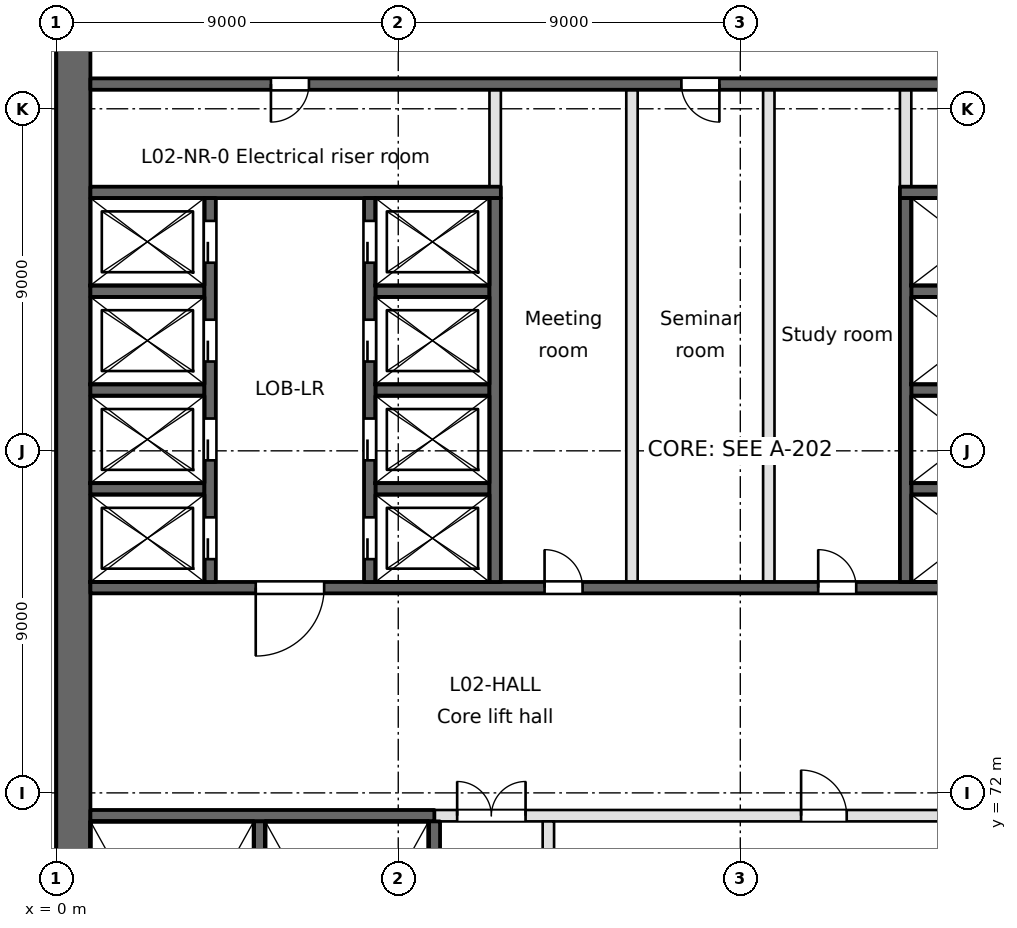
"""IFC4 building model, lengths in metres.
Left out: names, types, materials, properties, quantities, classifications, styles, units other than length and angle.
Written with IfcOpenShell. Run it as: python <this file> out.ifc"""

import sys

from ifc_helpers import new_model, si_unit, direction, frame, frame_2d, origin, place, context, subcontext, project, spatial, rectangle, extrude, element, fill, save


model = new_model("IFC4")
c1 = context("Model", 3, precision=1e-05, world=origin(), true_north=direction((0.0, 1.0)))
c2 = subcontext(c1, "Body", "Model", "MODEL_VIEW")
j1 = project(units=[si_unit("LENGTHUNIT", "METRE"), si_unit("PLANEANGLEUNIT", "RADIAN")], contexts=[c1])
p1 = place(None, origin())
s1 = spatial("IfcSite", under=j1, at=p1, CompositionType="ELEMENT")
p2 = place(p1, origin())
s2 = spatial("IfcBuilding", under=s1, at=p2, CompositionType="ELEMENT")
p3 = place(p2, frame((0.0, 0.0, 11.4)))
s3 = spatial("IfcBuildingStorey", under=s2, at=p3, CompositionType="ELEMENT", Elevation=11.4)
p4 = place(p3, frame((0.45, 94.5, 0.0), z_axis=(0.0, 0.0, 1.0), x_axis=(0.0, -1.0, 0.0)))
e1 = element("IfcWall", 1, at=p4, inside=s3, PredefinedType="SHEAR", context=c2, shape_type="SweptSolid", body=[
    extrude(rectangle(XDim=66.085, YDim=0.9, at=frame_2d((33.042, 0.0))), origin(), (0.0, 0.0, 1.0), 5.4),
])
p5 = place(p3, frame((0.9, 71.4, -0.35), z_axis=(0.0, 0.0, 1.0), x_axis=(1.0, 0.0, 0.0)))
e2 = element("IfcWall", 2, at=p5, inside=s3, PredefinedType="SOLIDWALL", context=c2, shape_type="SweptSolid", body=[
    extrude(rectangle(XDim=9.05, YDim=0.3, at=frame_2d((4.525, 0.0))), origin(), (0.0, 0.0, 1.0), 5.4),
])
p6 = place(p3, frame((9.95, 71.4, 0.0), z_axis=(0.0, 0.0, 1.0), x_axis=(1.0, 0.0, 0.0)))
e3 = element("IfcWall", 3, at=p6, inside=s3, PredefinedType="PARTITIONING", context=c2, shape_type="SweptSolid", body=[
    extrude(rectangle(XDim=17.65, YDim=0.3, at=frame_2d((8.825, 0.0))), origin(), (0.0, 0.0, 1.0), 5.05),
])
p7 = place(p6, frame((0.6, 0.0, 0.0)))
e4 = element("IfcOpeningElement", 4, at=p7, cuts=e3, PredefinedType="OPENING", context=c2, shape_type="SweptSolid", body=[
    extrude(rectangle(XDim=1.8, YDim=2.1, at=frame_2d((0.9, 1.05))), frame((0.0, 0.15, 0.0), z_axis=(0.0, -1.0, 0.0), x_axis=(1.0, 0.0, 0.0)), (0.0, 0.0, 1.0), 0.3),
])
p8 = place(p6, frame((9.65, 0.0, 0.0)))
e5 = element("IfcOpeningElement", 5, at=p8, cuts=e3, PredefinedType="OPENING", context=c2, shape_type="SweptSolid", body=[
    extrude(rectangle(XDim=1.2, YDim=2.1, at=frame_2d((0.6, 1.05))), frame((0.0, 0.15, 0.0), z_axis=(0.0, -1.0, 0.0), x_axis=(1.0, 0.0, 0.0)), (0.0, 0.0, 1.0), 0.3),
])
p9 = place(p3, frame((0.9, 77.4, -0.35), z_axis=(0.0, 0.0, 1.0), x_axis=(1.0, 0.0, 0.0)))
e6 = element("IfcWall", 6, at=p9, inside=s3, PredefinedType="SOLIDWALL", context=c2, shape_type="SweptSolid", body=[
    extrude(rectangle(XDim=28.95, YDim=0.3, at=frame_2d((14.475, 0.0))), origin(), (0.0, 0.0, 1.0), 5.4),
])
p10 = place(p9, frame((4.35, 0.0, 0.35)))
e7 = element("IfcOpeningElement", 7, at=p10, cuts=e6, PredefinedType="OPENING", context=c2, shape_type="SweptSolid", body=[
    extrude(rectangle(XDim=1.8, YDim=2.1, at=frame_2d((0.9, 1.05))), frame((0.0, 0.15, 0.0), z_axis=(0.0, -1.0, 0.0), x_axis=(1.0, 0.0, 0.0)), (0.0, 0.0, 1.0), 0.3),
])
p11 = place(p9, frame((25.95, 0.0, 0.35)))
e8 = element("IfcOpeningElement", 8, at=p11, cuts=e6, PredefinedType="OPENING", context=c2, shape_type="SweptSolid", body=[
    extrude(rectangle(XDim=1.8, YDim=2.1, at=frame_2d((0.9, 1.05))), frame((0.0, 0.15, 0.0), z_axis=(0.0, -1.0, 0.0), x_axis=(1.0, 0.0, 0.0)), (0.0, 0.0, 1.0), 0.3),
])
p12 = place(p9, frame((11.95, 0.0, 0.35)))
e9 = element("IfcOpeningElement", 9, at=p12, cuts=e6, PredefinedType="OPENING", context=c2, shape_type="SweptSolid", body=[
    extrude(rectangle(XDim=1.0, YDim=2.1, at=frame_2d((0.5, 1.05))), frame((0.0, 0.15, 0.0), z_axis=(0.0, -1.0, 0.0), x_axis=(1.0, 0.0, 0.0)), (0.0, 0.0, 1.0), 0.3),
])
p13 = place(p9, frame((19.15, 0.0, 0.35)))
e10 = element("IfcOpeningElement", 10, at=p13, cuts=e6, PredefinedType="OPENING", context=c2, shape_type="SweptSolid", body=[
    extrude(rectangle(XDim=1.0, YDim=2.1, at=frame_2d((0.5, 1.05))), frame((0.0, 0.15, 0.0), z_axis=(0.0, -1.0, 0.0), x_axis=(1.0, 0.0, 0.0)), (0.0, 0.0, 1.0), 0.3),
])
for number, where, z_axis, x_axis in (
    (11, (0.9, 80.0, -0.35), (0.0, 0.0, 1.0), (1.0, 0.0, 0.0)),
    (12, (8.4, 80.0, -0.35), (0.0, 0.0, 1.0), (1.0, 0.0, 0.0)),
    (13, (22.5, 80.0, -0.35), (0.0, 0.0, 1.0), (1.0, 0.0, 0.0)),
    (14, (0.9, 82.6, -0.35), (0.0, 0.0, 1.0), (1.0, 0.0, 0.0)),
    (15, (8.4, 82.6, -0.35), (0.0, 0.0, 1.0), (1.0, 0.0, 0.0)),
    (16, (22.5, 82.6, -0.35), (0.0, 0.0, 1.0), (1.0, 0.0, 0.0)),
    (17, (0.9, 85.2, -0.35), (0.0, 0.0, 1.0), (1.0, 0.0, 0.0)),
    (18, (8.4, 85.2, -0.35), (0.0, 0.0, 1.0), (1.0, 0.0, 0.0)),
    (19, (22.5, 85.2, -0.35), (0.0, 0.0, 1.0), (1.0, 0.0, 0.0)),
):
    element("IfcWall", number, at=place(p3, frame(where, z_axis=z_axis, x_axis=x_axis)), inside=s3, PredefinedType="SOLIDWALL", context=c2, shape_type="SweptSolid", body=[
        extrude(rectangle(XDim=3.0, YDim=0.3, at=frame_2d((1.5, 0.0))), origin(), (0.0, 0.0, 1.0), 5.4),
    ])
p14 = place(p3, frame((0.9, 87.8, -0.35), z_axis=(0.0, 0.0, 1.0), x_axis=(1.0, 0.0, 0.0)))
e20 = element("IfcWall", 20, at=p14, inside=s3, PredefinedType="SOLIDWALL", context=c2, shape_type="SweptSolid", body=[
    extrude(rectangle(XDim=10.8, YDim=0.3, at=frame_2d((5.4, 0.0))), origin(), (0.0, 0.0, 1.0), 5.4),
])
p15 = place(p3, frame((22.2, 87.8, -0.35), z_axis=(0.0, 0.0, 1.0), x_axis=(1.0, 0.0, 0.0)))
e21 = element("IfcWall", 21, at=p15, inside=s3, PredefinedType="SOLIDWALL", context=c2, shape_type="SweptSolid", body=[
    extrude(rectangle(XDim=7.8, YDim=0.3, at=frame_2d((3.9, 0.0))), origin(), (0.0, 0.0, 1.0), 5.4),
])
p16 = place(p3, frame((0.9, 90.65, -0.35), z_axis=(0.0, 0.0, 1.0), x_axis=(1.0, 0.0, 0.0)))
e22 = element("IfcWall", 22, at=p16, inside=s3, PredefinedType="SOLIDWALL", context=c2, shape_type="SweptSolid", body=[
    extrude(rectangle(XDim=34.6, YDim=0.3, at=frame_2d((17.3, 0.0))), origin(), (0.0, 0.0, 1.0), 5.4),
])
p17 = place(p16, frame((4.75, 0.0, 0.35)))
e23 = element("IfcOpeningElement", 23, at=p17, cuts=e22, PredefinedType="OPENING", context=c2, shape_type="SweptSolid", body=[
    extrude(rectangle(XDim=1.0, YDim=2.1, at=frame_2d((0.5, 1.05))), frame((0.0, 0.15, 0.0), z_axis=(0.0, -1.0, 0.0), x_axis=(1.0, 0.0, 0.0)), (0.0, 0.0, 1.0), 0.3),
])
p18 = place(p16, frame((24.7, 0.0, 0.35)))
e24 = element("IfcOpeningElement", 24, at=p18, cuts=e22, PredefinedType="OPENING", context=c2, shape_type="SweptSolid", body=[
    extrude(rectangle(XDim=1.0, YDim=2.1, at=frame_2d((0.5, 1.05))), frame((0.0, 0.15, 0.0), z_axis=(0.0, -1.0, 0.0), x_axis=(1.0, 0.0, 0.0)), (0.0, 0.0, 1.0), 0.3),
])
p19 = place(p16, frame((15.55, 0.0, 0.35)))
e25 = element("IfcOpeningElement", 25, at=p19, cuts=e22, PredefinedType="OPENING", context=c2, shape_type="SweptSolid", body=[
    extrude(rectangle(XDim=1.0, YDim=2.1, at=frame_2d((0.5, 1.05))), frame((0.0, 0.15, 0.0), z_axis=(0.0, -1.0, 0.0), x_axis=(1.0, 0.0, 0.0)), (0.0, 0.0, 1.0), 0.3),
])
p20 = place(p16, frame((31.4, 0.0, 0.35)))
e26 = element("IfcOpeningElement", 26, at=p20, cuts=e22, PredefinedType="OPENING", context=c2, shape_type="SweptSolid", body=[
    extrude(rectangle(XDim=1.0, YDim=2.1, at=frame_2d((0.5, 1.05))), frame((0.0, 0.15, 0.0), z_axis=(0.0, -1.0, 0.0), x_axis=(1.0, 0.0, 0.0)), (0.0, 0.0, 1.0), 0.3),
])
p21 = place(p3, frame((4.05, 77.55, -0.35), z_axis=(0.0, 0.0, 1.0), x_axis=(0.0, 1.0, 0.0)))
e27 = element("IfcWall", 27, at=p21, inside=s3, PredefinedType="SOLIDWALL", context=c2, shape_type="SweptSolid", body=[
    extrude(rectangle(XDim=10.1, YDim=0.3, at=frame_2d((5.05, 0.0))), origin(), (0.0, 0.0, 1.0), 5.4),
])
p22 = place(p21, frame((0.6, 0.0, 0.35)))
e28 = element("IfcOpeningElement", 28, at=p22, cuts=e27, PredefinedType="OPENING", context=c2, shape_type="SweptSolid", body=[
    extrude(rectangle(XDim=1.1, YDim=2.1, at=frame_2d((0.55, 1.05))), frame((0.0, 0.15, 0.0), z_axis=(0.0, -1.0, 0.0), x_axis=(1.0, 0.0, 0.0)), (0.0, 0.0, 1.0), 0.3),
])
p23 = place(p21, frame((3.2, 0.0, 0.35)))
e29 = element("IfcOpeningElement", 29, at=p23, cuts=e27, PredefinedType="OPENING", context=c2, shape_type="SweptSolid", body=[
    extrude(rectangle(XDim=1.1, YDim=2.1, at=frame_2d((0.55, 1.05))), frame((0.0, 0.15, 0.0), z_axis=(0.0, -1.0, 0.0), x_axis=(1.0, 0.0, 0.0)), (0.0, 0.0, 1.0), 0.3),
])
p24 = place(p21, frame((5.8, 0.0, 0.35)))
e30 = element("IfcOpeningElement", 30, at=p24, cuts=e27, PredefinedType="OPENING", context=c2, shape_type="SweptSolid", body=[
    extrude(rectangle(XDim=1.1, YDim=2.1, at=frame_2d((0.55, 1.05))), frame((0.0, 0.15, 0.0), z_axis=(0.0, -1.0, 0.0), x_axis=(1.0, 0.0, 0.0)), (0.0, 0.0, 1.0), 0.3),
])
p25 = place(p21, frame((8.4, 0.0, 0.35)))
e31 = element("IfcOpeningElement", 31, at=p25, cuts=e27, PredefinedType="OPENING", context=c2, shape_type="SweptSolid", body=[
    extrude(rectangle(XDim=1.1, YDim=2.1, at=frame_2d((0.55, 1.05))), frame((0.0, 0.15, 0.0), z_axis=(0.0, -1.0, 0.0), x_axis=(1.0, 0.0, 0.0)), (0.0, 0.0, 1.0), 0.3),
])
p26 = place(p3, frame((5.35, 63.5, -0.35), z_axis=(0.0, 0.0, 1.0), x_axis=(0.0, 1.0, 0.0)))
e32 = element("IfcWall", 32, at=p26, inside=s3, PredefinedType="SOLIDWALL", context=c2, shape_type="SweptSolid", body=[
    extrude(rectangle(XDim=7.75, YDim=0.3, at=frame_2d((3.875, 0.0))), origin(), (0.0, 0.0, 1.0), 5.4),
])
p27 = place(p3, frame((8.25, 77.55, -0.35), z_axis=(0.0, 0.0, 1.0), x_axis=(0.0, 1.0, 0.0)))
e33 = element("IfcWall", 33, at=p27, inside=s3, PredefinedType="SOLIDWALL", context=c2, shape_type="SweptSolid", body=[
    extrude(rectangle(XDim=10.1, YDim=0.3, at=frame_2d((5.05, 0.0))), origin(), (0.0, 0.0, 1.0), 5.4),
])
p28 = place(p27, frame((0.6, 0.0, 0.35)))
e34 = element("IfcOpeningElement", 34, at=p28, cuts=e33, PredefinedType="OPENING", context=c2, shape_type="SweptSolid", body=[
    extrude(rectangle(XDim=1.1, YDim=2.1, at=frame_2d((0.55, 1.05))), frame((0.0, 0.15, 0.0), z_axis=(0.0, -1.0, 0.0), x_axis=(1.0, 0.0, 0.0)), (0.0, 0.0, 1.0), 0.3),
])
p29 = place(p27, frame((3.2, 0.0, 0.35)))
e35 = element("IfcOpeningElement", 35, at=p29, cuts=e33, PredefinedType="OPENING", context=c2, shape_type="SweptSolid", body=[
    extrude(rectangle(XDim=1.1, YDim=2.1, at=frame_2d((0.55, 1.05))), frame((0.0, 0.15, 0.0), z_axis=(0.0, -1.0, 0.0), x_axis=(1.0, 0.0, 0.0)), (0.0, 0.0, 1.0), 0.3),
])
p30 = place(p27, frame((5.8, 0.0, 0.35)))
e36 = element("IfcOpeningElement", 36, at=p30, cuts=e33, PredefinedType="OPENING", context=c2, shape_type="SweptSolid", body=[
    extrude(rectangle(XDim=1.1, YDim=2.1, at=frame_2d((0.55, 1.05))), frame((0.0, 0.15, 0.0), z_axis=(0.0, -1.0, 0.0), x_axis=(1.0, 0.0, 0.0)), (0.0, 0.0, 1.0), 0.3),
])
p31 = place(p27, frame((8.4, 0.0, 0.35)))
e37 = element("IfcOpeningElement", 37, at=p31, cuts=e33, PredefinedType="OPENING", context=c2, shape_type="SweptSolid", body=[
    extrude(rectangle(XDim=1.1, YDim=2.1, at=frame_2d((0.55, 1.05))), frame((0.0, 0.15, 0.0), z_axis=(0.0, -1.0, 0.0), x_axis=(1.0, 0.0, 0.0)), (0.0, 0.0, 1.0), 0.3),
])
p32 = place(p3, frame((9.95, 63.5, -0.35), z_axis=(0.0, 0.0, 1.0), x_axis=(0.0, 1.0, 0.0)))
e38 = element("IfcWall", 38, at=p32, inside=s3, PredefinedType="SOLIDWALL", context=c2, shape_type="SweptSolid", body=[
    extrude(rectangle(XDim=7.75, YDim=0.3, at=frame_2d((3.875, 0.0))), origin(), (0.0, 0.0, 1.0), 5.4),
])
p33 = place(p3, frame((11.55, 77.55, -0.35), z_axis=(0.0, 0.0, 1.0), x_axis=(0.0, 1.0, 0.0)))
e39 = element("IfcWall", 39, at=p33, inside=s3, PredefinedType="SOLIDWALL", context=c2, shape_type="SweptSolid", body=[
    extrude(rectangle(XDim=10.1, YDim=0.3, at=frame_2d((5.05, 0.0))), origin(), (0.0, 0.0, 1.0), 5.4),
])
p34 = place(p3, frame((11.55, 87.95, 0.0), z_axis=(0.0, 0.0, 1.0), x_axis=(0.0, 1.0, 0.0)))
e40 = element("IfcWall", 40, at=p34, inside=s3, PredefinedType="PARTITIONING", context=c2, shape_type="SweptSolid", body=[
    extrude(rectangle(XDim=2.55, YDim=0.3, at=frame_2d((1.275, 0.0))), origin(), (0.0, 0.0, 1.0), 5.05),
])
p35 = place(p3, frame((12.95, 63.5, 0.0), z_axis=(0.0, 0.0, 1.0), x_axis=(0.0, 1.0, 0.0)))
e41 = element("IfcWall", 41, at=p35, inside=s3, PredefinedType="PARTITIONING", context=c2, shape_type="SweptSolid", body=[
    extrude(rectangle(XDim=7.75, YDim=0.3, at=frame_2d((3.875, 0.0))), origin(), (0.0, 0.0, 1.0), 5.05),
])
for number, where, z_axis, x_axis in (
    (42, (15.15, 77.55, 0.0), (0.0, 0.0, 1.0), (0.0, 1.0, 0.0)),
    (43, (18.75, 77.55, 0.0), (0.0, 0.0, 1.0), (0.0, 1.0, 0.0)),
):
    element("IfcWall", number, at=place(p3, frame(where, z_axis=z_axis, x_axis=x_axis)), inside=s3, PredefinedType="PARTITIONING", context=c2, shape_type="SweptSolid", body=[
        extrude(rectangle(XDim=12.95, YDim=0.3, at=frame_2d((6.475, 0.0))), origin(), (0.0, 0.0, 1.0), 5.05),
    ])
p36 = place(p3, frame((22.35, 77.55, -0.35), z_axis=(0.0, 0.0, 1.0), x_axis=(0.0, 1.0, 0.0)))
e44 = element("IfcWall", 44, at=p36, inside=s3, PredefinedType="SOLIDWALL", context=c2, shape_type="SweptSolid", body=[
    extrude(rectangle(XDim=10.1, YDim=0.3, at=frame_2d((5.05, 0.0))), origin(), (0.0, 0.0, 1.0), 5.4),
])
p37 = place(p3, frame((22.35, 87.95, 0.0), z_axis=(0.0, 0.0, 1.0), x_axis=(0.0, 1.0, 0.0)))
e45 = element("IfcWall", 45, at=p37, inside=s3, PredefinedType="PARTITIONING", context=c2, shape_type="SweptSolid", body=[
    extrude(rectangle(XDim=2.55, YDim=0.3, at=frame_2d((1.275, 0.0))), origin(), (0.0, 0.0, 1.0), 5.05),
])
p38 = place(p22, origin())
e46 = element("IfcDoor", 46, at=p38, inside=s3, OperationType="SLIDING_TO_RIGHT", PredefinedType="DOOR", context=c2, shape_type="SweptSolid", body=[
    extrude(rectangle(XDim=1.1, YDim=2.1, at=frame_2d((0.55, 1.05))), frame((0.0, 0.025, 0.0), z_axis=(0.0, -1.0, 0.0), x_axis=(1.0, 0.0, 0.0)), (0.0, 0.0, 1.0), 0.05),
])
fill(e28, e46)
p39 = place(p23, origin())
e47 = element("IfcDoor", 47, at=p39, inside=s3, OperationType="SLIDING_TO_LEFT", PredefinedType="DOOR", context=c2, shape_type="SweptSolid", body=[
    extrude(rectangle(XDim=1.1, YDim=2.1, at=frame_2d((0.55, 1.05))), frame((0.0, 0.025, 0.0), z_axis=(0.0, -1.0, 0.0), x_axis=(1.0, 0.0, 0.0)), (0.0, 0.0, 1.0), 0.05),
])
fill(e29, e47)
p40 = place(p24, origin())
e48 = element("IfcDoor", 48, at=p40, inside=s3, OperationType="SLIDING_TO_RIGHT", PredefinedType="DOOR", context=c2, shape_type="SweptSolid", body=[
    extrude(rectangle(XDim=1.1, YDim=2.1, at=frame_2d((0.55, 1.05))), frame((0.0, 0.025, 0.0), z_axis=(0.0, -1.0, 0.0), x_axis=(1.0, 0.0, 0.0)), (0.0, 0.0, 1.0), 0.05),
])
fill(e30, e48)
p41 = place(p25, origin())
e49 = element("IfcDoor", 49, at=p41, inside=s3, OperationType="SLIDING_TO_LEFT", PredefinedType="DOOR", context=c2, shape_type="SweptSolid", body=[
    extrude(rectangle(XDim=1.1, YDim=2.1, at=frame_2d((0.55, 1.05))), frame((0.0, 0.025, 0.0), z_axis=(0.0, -1.0, 0.0), x_axis=(1.0, 0.0, 0.0)), (0.0, 0.0, 1.0), 0.05),
])
fill(e31, e49)
p42 = place(p28, origin())
e50 = element("IfcDoor", 50, at=p42, inside=s3, OperationType="SLIDING_TO_RIGHT", PredefinedType="DOOR", context=c2, shape_type="SweptSolid", body=[
    extrude(rectangle(XDim=1.1, YDim=2.1, at=frame_2d((0.55, 1.05))), frame((0.0, 0.025, 0.0), z_axis=(0.0, -1.0, 0.0), x_axis=(1.0, 0.0, 0.0)), (0.0, 0.0, 1.0), 0.05),
])
fill(e34, e50)
p43 = place(p29, origin())
e51 = element("IfcDoor", 51, at=p43, inside=s3, OperationType="SLIDING_TO_LEFT", PredefinedType="DOOR", context=c2, shape_type="SweptSolid", body=[
    extrude(rectangle(XDim=1.1, YDim=2.1, at=frame_2d((0.55, 1.05))), frame((0.0, 0.025, 0.0), z_axis=(0.0, -1.0, 0.0), x_axis=(1.0, 0.0, 0.0)), (0.0, 0.0, 1.0), 0.05),
])
fill(e35, e51)
p44 = place(p30, origin())
e52 = element("IfcDoor", 52, at=p44, inside=s3, OperationType="SLIDING_TO_RIGHT", PredefinedType="DOOR", context=c2, shape_type="SweptSolid", body=[
    extrude(rectangle(XDim=1.1, YDim=2.1, at=frame_2d((0.55, 1.05))), frame((0.0, 0.025, 0.0), z_axis=(0.0, -1.0, 0.0), x_axis=(1.0, 0.0, 0.0)), (0.0, 0.0, 1.0), 0.05),
])
fill(e36, e52)
p45 = place(p31, origin())
e53 = element("IfcDoor", 53, at=p45, inside=s3, OperationType="SLIDING_TO_LEFT", PredefinedType="DOOR", context=c2, shape_type="SweptSolid", body=[
    extrude(rectangle(XDim=1.1, YDim=2.1, at=frame_2d((0.55, 1.05))), frame((0.0, 0.025, 0.0), z_axis=(0.0, -1.0, 0.0), x_axis=(1.0, 0.0, 0.0)), (0.0, 0.0, 1.0), 0.05),
])
fill(e37, e53)
p46 = place(p10, frame((1.8, 0.0, 0.0), z_axis=(0.0, 0.0, 1.0), x_axis=(-1.0, 0.0, 0.0)))
e54 = element("IfcDoor", 54, at=p46, inside=s3, OperationType="SINGLE_SWING_RIGHT", PredefinedType="DOOR", context=c2, shape_type="SweptSolid", body=[
    extrude(rectangle(XDim=1.8, YDim=2.1, at=frame_2d((0.9, 1.05))), frame((0.0, 0.025, 0.0), z_axis=(0.0, -1.0, 0.0), x_axis=(1.0, 0.0, 0.0)), (0.0, 0.0, 1.0), 0.05),
])
fill(e7, e54)
p47 = place(p7, origin())
e55 = element("IfcDoor", 55, at=p47, inside=s3, OperationType="DOUBLE_DOOR_SINGLE_SWING", PredefinedType="DOOR", context=c2, shape_type="SweptSolid", body=[
    extrude(rectangle(XDim=1.8, YDim=2.1, at=frame_2d((0.9, 1.05))), frame((0.0, 0.025, 0.0), z_axis=(0.0, -1.0, 0.0), x_axis=(1.0, 0.0, 0.0)), (0.0, 0.0, 1.0), 0.05),
])
fill(e4, e55)
p48 = place(p8, origin())
e56 = element("IfcDoor", 56, at=p48, inside=s3, OperationType="SINGLE_SWING_LEFT", PredefinedType="DOOR", context=c2, shape_type="SweptSolid", body=[
    extrude(rectangle(XDim=1.2, YDim=2.1, at=frame_2d((0.6, 1.05))), frame((0.0, 0.025, 0.0), z_axis=(0.0, -1.0, 0.0), x_axis=(1.0, 0.0, 0.0)), (0.0, 0.0, 1.0), 0.05),
])
fill(e5, e56)
p49 = place(p17, frame((1.0, 0.0, 0.0), z_axis=(0.0, 0.0, 1.0), x_axis=(-1.0, 0.0, 0.0)))
e57 = element("IfcDoor", 57, at=p49, inside=s3, OperationType="SINGLE_SWING_RIGHT", PredefinedType="DOOR", context=c2, shape_type="SweptSolid", body=[
    extrude(rectangle(XDim=1.0, YDim=2.1, at=frame_2d((0.5, 1.05))), frame((0.0, 0.025, 0.0), z_axis=(0.0, -1.0, 0.0), x_axis=(1.0, 0.0, 0.0)), (0.0, 0.0, 1.0), 0.05),
])
fill(e23, e57)
p50 = place(p12, origin())
e58 = element("IfcDoor", 58, at=p50, inside=s3, OperationType="SINGLE_SWING_LEFT", PredefinedType="DOOR", context=c2, shape_type="SweptSolid", body=[
    extrude(rectangle(XDim=1.0, YDim=2.1, at=frame_2d((0.5, 1.05))), frame((0.0, 0.025, 0.0), z_axis=(0.0, -1.0, 0.0), x_axis=(1.0, 0.0, 0.0)), (0.0, 0.0, 1.0), 0.05),
])
fill(e9, e58)
p51 = place(p19, frame((1.0, 0.0, 0.0), z_axis=(0.0, 0.0, 1.0), x_axis=(-1.0, 0.0, 0.0)))
e59 = element("IfcDoor", 59, at=p51, inside=s3, OperationType="SINGLE_SWING_LEFT", PredefinedType="DOOR", context=c2, shape_type="SweptSolid", body=[
    extrude(rectangle(XDim=1.0, YDim=2.1, at=frame_2d((0.5, 1.05))), frame((0.0, 0.025, 0.0), z_axis=(0.0, -1.0, 0.0), x_axis=(1.0, 0.0, 0.0)), (0.0, 0.0, 1.0), 0.05),
])
fill(e25, e59)
p52 = place(p13, origin())
e60 = element("IfcDoor", 60, at=p52, inside=s3, OperationType="SINGLE_SWING_LEFT", PredefinedType="DOOR", context=c2, shape_type="SweptSolid", body=[
    extrude(rectangle(XDim=1.0, YDim=2.1, at=frame_2d((0.5, 1.05))), frame((0.0, 0.025, 0.0), z_axis=(0.0, -1.0, 0.0), x_axis=(1.0, 0.0, 0.0)), (0.0, 0.0, 1.0), 0.05),
])
fill(e10, e60)
save(model, sys.argv[1])
